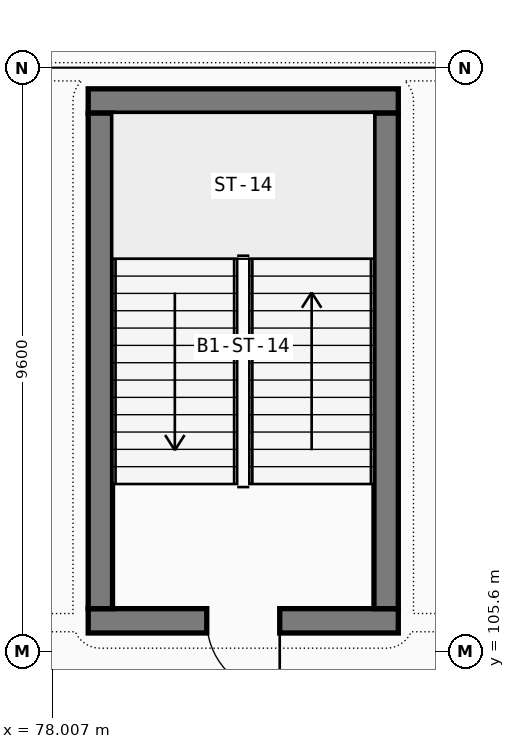
"""IFC4 building model, lengths in metres.
Left out: names, types, materials, properties, quantities, classifications, styles, units other than length and angle.
Written with IfcOpenShell. Run it as: python <this file> out.ifc"""

import sys

from ifc_helpers import new_model, si_unit, direction, frame, frame_2d, origin, place, context, subcontext, project, spatial, rectangle, extrude, element, fill, save


model = new_model("IFC4")
c1 = context("Model", 3, precision=1e-05, world=origin(), true_north=direction((0.0, 1.0)))
c2 = subcontext(c1, "Body", "Model", "MODEL_VIEW")
j1 = project(units=[si_unit("LENGTHUNIT", "METRE"), si_unit("PLANEANGLEUNIT", "RADIAN")], contexts=[c1])
p1 = place(None, origin())
s1 = spatial("IfcSite", under=j1, at=p1, CompositionType="ELEMENT")
p2 = place(p1, origin())
s2 = spatial("IfcBuilding", under=s1, at=p2, CompositionType="ELEMENT")
p3 = place(p2, frame((0.0, 0.0, -4.8)))
s3 = spatial("IfcBuildingStorey", under=s2, at=p3, CompositionType="ELEMENT", Elevation=-4.8)
p4 = place(p3, frame((78.6, 106.1, 0.0), z_axis=(0.0, 0.0, 1.0), x_axis=(1.0, 0.0, 0.0)))
e1 = element("IfcWall", 1, at=p4, inside=s3, PredefinedType="SHEAR", context=c2, shape_type="SweptSolid", body=[
    extrude(rectangle(XDim=5.1, YDim=0.4, at=frame_2d((2.55, 0.0))), origin(), (0.0, 0.0, 1.0), 4.5),
])
p5 = place(p4, frame((3.15, 0.0, 0.0), z_axis=(0.0, 0.0, 1.0), x_axis=(-1.0, 0.0, 0.0)))
e2 = element("IfcOpeningElement", 2, at=p5, cuts=e1, PredefinedType="OPENING", context=c2, shape_type="SweptSolid", body=[
    extrude(rectangle(XDim=1.2, YDim=2.2, at=frame_2d((0.6, 1.1))), frame((0.0, 0.21, 0.0), z_axis=(0.0, -1.0, 0.0), x_axis=(1.0, 0.0, 0.0)), (0.0, 0.0, 1.0), 0.42),
])
p6 = place(p3, frame((83.7, 114.65, 0.0), z_axis=(0.0, 0.0, 1.0), x_axis=(-1.0, 0.0, 0.0)))
e3 = element("IfcWall", 3, at=p6, inside=s3, PredefinedType="SHEAR", context=c2, shape_type="SweptSolid", body=[
    extrude(rectangle(XDim=5.1, YDim=0.4, at=frame_2d((2.55, 0.0))), origin(), (0.0, 0.0, 1.0), 4.5),
])
for number, where, z_axis, x_axis in (
    (4, (78.8, 114.45, 0.0), (0.0, 0.0, 1.0), (0.0, -1.0, 0.0)),
    (5, (83.5, 106.3, 0.0), (0.0, 0.0, 1.0), (0.0, 1.0, 0.0)),
):
    element("IfcWall", number, at=place(p3, frame(where, z_axis=z_axis, x_axis=x_axis)), inside=s3, PredefinedType="SHEAR", context=c2, shape_type="SweptSolid", body=[
        extrude(rectangle(XDim=8.15, YDim=0.4, at=frame_2d((4.075, 0.0))), origin(), (0.0, 0.0, 1.0), 4.5),
    ])
p7 = place(p5, origin())
e6 = element("IfcDoor", 6, at=p7, inside=s3, OperationType="SINGLE_SWING_LEFT", PredefinedType="DOOR", context=c2, shape_type="SweptSolid", body=[
    extrude(rectangle(XDim=1.2, YDim=2.2, at=frame_2d((0.6, 1.1))), frame((0.0, 0.025, 0.0), z_axis=(0.0, -1.0, 0.0), x_axis=(1.0, 0.0, 0.0)), (0.0, 0.0, 1.0), 0.05),
])
fill(e2, e6)
save(model, sys.argv[1])
